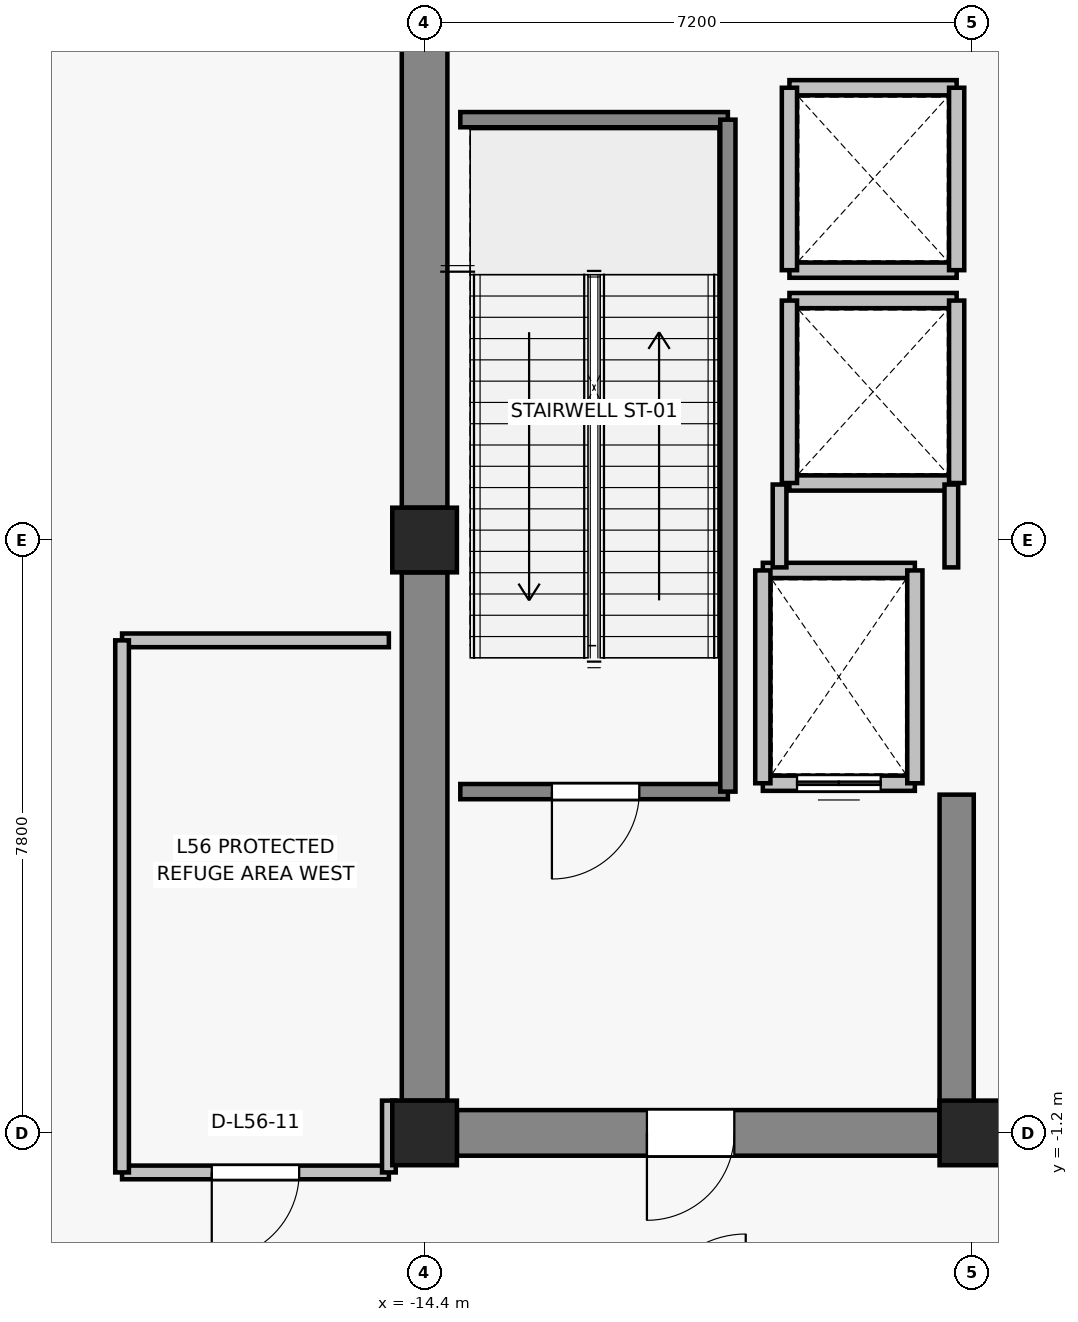
"""IFC4 building model, lengths in metres.
Left out: names, types, materials, properties, quantities, classifications, styles, units other than length and angle.
Written with IfcOpenShell. Run it as: python <this file> out.ifc"""

import sys

from ifc_helpers import new_model, si_unit, direction, frame, frame_2d, origin, origin_2d, place, context, subcontext, project, spatial, rectangle, extrude, source, transform, mapped, element, fill, save


model = new_model("IFC4")
c1 = context("Model", 3, precision=1e-05, world=origin(), true_north=direction((0.0, 1.0)))
c2 = subcontext(c1, "Body", "Model", "MODEL_VIEW")
j1 = project(units=[si_unit("LENGTHUNIT", "METRE"), si_unit("PLANEANGLEUNIT", "RADIAN")], contexts=[c1])
p1 = place(None, origin())
s1 = spatial("IfcSite", under=j1, at=p1, CompositionType="ELEMENT")
p2 = place(p1, origin())
s2 = spatial("IfcBuilding", under=s1, at=p2, CompositionType="ELEMENT")
p3 = place(p2, frame((0.0, 0.0, 199.0)))
s3 = spatial("IfcBuildingStorey", under=s2, at=p3, CompositionType="ELEMENT", Elevation=199.0)
for number, where, z_axis, x_axis in (
    (1, (-14.4, -1.2, 0.0), (0.0, 0.0, 1.0), (1.0, 0.0, 0.0)),
    (2, (-7.2, -1.2, 0.0), (0.0, 0.0, 1.0), (1.0, 0.0, 0.0)),
    (3, (-14.4, 6.6, 0.0), (0.0, 0.0, 1.0), (1.0, 0.0, 0.0)),
):
    element("IfcColumn", number, at=place(p3, frame(where, z_axis=z_axis, x_axis=x_axis)), inside=s3, PredefinedType="COLUMN", context=c2, shape_type="SweptSolid", body=[
        extrude(rectangle(XDim=0.85, YDim=0.85, at=origin_2d()), origin(), (0.0, 0.0, 1.0), 6.6),
    ])
p4 = place(p3, frame((-14.4, -0.775, 0.0), z_axis=(0.0, 0.0, 1.0), x_axis=(0.0, 1.0, 0.0)))
e4 = element("IfcWall", 4, at=p4, inside=s3, PredefinedType="SHEAR", context=c2, shape_type="SweptSolid", body=[
    extrude(rectangle(XDim=6.95, YDim=0.6, at=frame_2d((3.475, 0.0))), origin(), (0.0, 0.0, 1.0), 6.35),
])
p5 = place(p3, frame((-14.4, 7.025, 0.0), z_axis=(0.0, 0.0, 1.0), x_axis=(0.0, 1.0, 0.0)))
e5 = element("IfcWall", 5, at=p5, inside=s3, PredefinedType="SHEAR", context=c2, shape_type="SweptSolid", body=[
    extrude(rectangle(XDim=6.05, YDim=0.6, at=frame_2d((3.025, 0.0))), origin(), (0.0, 0.0, 1.0), 6.35),
])
p6 = place(p3, frame((-7.625, -1.2, 0.0), z_axis=(0.0, 0.0, 1.0), x_axis=(-1.0, 0.0, 0.0)))
e6 = element("IfcWall", 6, at=p6, inside=s3, PredefinedType="SHEAR", context=c2, shape_type="SweptSolid", body=[
    extrude(rectangle(XDim=6.35, YDim=0.6, at=frame_2d((3.175, 0.0))), origin(), (0.0, 0.0, 1.0), 6.35),
])
p7 = place(p6, frame((2.7, 0.0, 0.0)))
e7 = element("IfcOpeningElement", 7, at=p7, cuts=e6, PredefinedType="OPENING", context=c2, shape_type="SweptSolid", body=[
    extrude(rectangle(XDim=1.15, YDim=2.15, at=frame_2d((0.575, 1.075))), frame((0.0, 0.31, 0.0), z_axis=(0.0, -1.0, 0.0), x_axis=(1.0, 0.0, 0.0)), (0.0, 0.0, 1.0), 0.62),
])
p8 = place(p3, frame((-7.4, -0.9, 0.0), z_axis=(0.0, 0.0, 1.0), x_axis=(0.0, 1.0, 0.0)))
e8 = element("IfcWall", 8, at=p8, inside=s3, PredefinedType="SHEAR", context=c2, shape_type="SweptSolid", body=[
    extrude(rectangle(XDim=4.15, YDim=0.45, at=frame_2d((2.075, 0.0))), origin(), (0.0, 0.0, 1.0), 6.35),
])
p9 = place(p3, frame((-7.95, 3.4, 0.0), z_axis=(0.0, 0.0, 1.0), x_axis=(-1.0, 0.0, 0.0)))
e9 = element("IfcWall", 9, at=p9, inside=s3, PredefinedType="SOLIDWALL", context=c2, shape_type="SweptSolid", body=[
    extrude(rectangle(XDim=2.0, YDim=0.2, at=frame_2d((1.0, 0.0))), origin(), (0.0, 0.0, 1.0), 6.35),
])
p10 = place(p9, frame((0.45, 0.0, 0.0)))
e10 = element("IfcOpeningElement", 10, at=p10, cuts=e9, PredefinedType="OPENING", context=c2, shape_type="SweptSolid", body=[
    extrude(rectangle(XDim=1.1, YDim=2.2, at=frame_2d((0.55, 1.1))), frame((0.0, 0.11, 0.0), z_axis=(0.0, -1.0, 0.0), x_axis=(1.0, 0.0, 0.0)), (0.0, 0.0, 1.0), 0.22),
])
p11 = place(p3, frame((-9.95, 6.2, 0.0), z_axis=(0.0, 0.0, 1.0), x_axis=(1.0, 0.0, 0.0)))
e11 = element("IfcWall", 11, at=p11, inside=s3, PredefinedType="SOLIDWALL", context=c2, shape_type="SweptSolid", body=[
    extrude(rectangle(XDim=2.0, YDim=0.2, at=frame_2d((1.0, 0.0))), origin(), (0.0, 0.0, 1.0), 6.35),
])
for number, where, z_axis, x_axis in (
    (12, (-9.95, 3.4, 0.0), (0.0, 0.0, 1.0), (0.0, 1.0, 0.0)),
    (13, (-7.95, 6.2, 0.0), (0.0, 0.0, 1.0), (0.0, -1.0, 0.0)),
):
    element("IfcWall", number, at=place(p3, frame(where, z_axis=z_axis, x_axis=x_axis)), inside=s3, PredefinedType="SOLIDWALL", context=c2, shape_type="SweptSolid", body=[
        extrude(rectangle(XDim=2.8, YDim=0.2, at=frame_2d((1.4, 0.0))), origin(), (0.0, 0.0, 1.0), 6.35),
    ])
for number, where, z_axis, x_axis in (
    (14, (-7.4, 7.35, 0.0), (0.0, 0.0, 1.0), (-1.0, 0.0, 0.0)),
    (15, (-9.6, 9.75, 0.0), (0.0, 0.0, 1.0), (1.0, 0.0, 0.0)),
):
    element("IfcWall", number, at=place(p3, frame(where, z_axis=z_axis, x_axis=x_axis)), inside=s3, PredefinedType="SOLIDWALL", context=c2, shape_type="SweptSolid", body=[
        extrude(rectangle(XDim=2.2, YDim=0.2, at=frame_2d((1.1, 0.0))), origin(), (0.0, 0.0, 1.0), 5.89),
    ])
p12 = place(p3, frame((-9.6, 7.35, 0.0), z_axis=(0.0, 0.0, 1.0), x_axis=(0.0, 1.0, 0.0)))
e16 = element("IfcWall", 16, at=p12, inside=s3, PredefinedType="SOLIDWALL", context=c2, shape_type="SweptSolid", body=[
    extrude(rectangle(XDim=2.4, YDim=0.2, at=frame_2d((1.2, 0.0))), origin(), (0.0, 0.0, 1.0), 6.35),
])
p13 = place(p3, frame((-7.4, 9.75, 0.0), z_axis=(0.0, 0.0, 1.0), x_axis=(0.0, -1.0, 0.0)))
e17 = element("IfcWall", 17, at=p13, inside=s3, PredefinedType="SOLIDWALL", context=c2, shape_type="SweptSolid", body=[
    extrude(rectangle(XDim=2.4, YDim=0.2, at=frame_2d((1.2, 0.0))), origin(), (0.0, 0.0, 1.0), 5.89),
])
for number, where, z_axis, x_axis in (
    (18, (-7.4, 10.15, 0.0), (0.0, 0.0, 1.0), (-1.0, 0.0, 0.0)),
    (19, (-9.6, 12.55, 0.0), (0.0, 0.0, 1.0), (1.0, 0.0, 0.0)),
):
    element("IfcWall", number, at=place(p3, frame(where, z_axis=z_axis, x_axis=x_axis)), inside=s3, PredefinedType="SOLIDWALL", context=c2, shape_type="SweptSolid", body=[
        extrude(rectangle(XDim=2.2, YDim=0.2, at=frame_2d((1.1, 0.0))), origin(), (0.0, 0.0, 1.0), 5.89),
    ])
p14 = place(p3, frame((-9.6, 10.15, 0.0), z_axis=(0.0, 0.0, 1.0), x_axis=(0.0, 1.0, 0.0)))
e20 = element("IfcWall", 20, at=p14, inside=s3, PredefinedType="SOLIDWALL", context=c2, shape_type="SweptSolid", body=[
    extrude(rectangle(XDim=2.4, YDim=0.2, at=frame_2d((1.2, 0.0))), origin(), (0.0, 0.0, 1.0), 6.35),
])
p15 = place(p3, frame((-7.4, 12.55, 0.0), z_axis=(0.0, 0.0, 1.0), x_axis=(0.0, -1.0, 0.0)))
e21 = element("IfcWall", 21, at=p15, inside=s3, PredefinedType="SOLIDWALL", context=c2, shape_type="SweptSolid", body=[
    extrude(rectangle(XDim=2.4, YDim=0.2, at=frame_2d((1.2, 0.0))), origin(), (0.0, 0.0, 1.0), 5.89),
])
p16 = place(p3, frame((-10.41, 3.29, 0.0), z_axis=(0.0, 0.0, 1.0), x_axis=(-1.0, 0.0, 0.0)))
e22 = element("IfcWall", 22, at=p16, inside=s3, PredefinedType="SOLIDWALL", context=c2, shape_type="SweptSolid", body=[
    extrude(rectangle(XDim=3.52, YDim=0.2, at=frame_2d((1.76, 0.0))), origin(), (0.0, 0.0, 1.0), 6.35),
])
p17 = place(p16, frame((1.165, 0.0, 0.0)))
e23 = element("IfcOpeningElement", 23, at=p17, cuts=e22, PredefinedType="OPENING", context=c2, shape_type="SweptSolid", body=[
    extrude(rectangle(XDim=1.15, YDim=2.15, at=frame_2d((0.575, 1.075))), frame((0.0, 0.11, 0.0), z_axis=(0.0, -1.0, 0.0), x_axis=(1.0, 0.0, 0.0)), (0.0, 0.0, 1.0), 0.22),
])
p18 = place(p3, frame((-13.93, 12.13, 0.0), z_axis=(0.0, 0.0, 1.0), x_axis=(1.0, 0.0, 0.0)))
e24 = element("IfcWall", 24, at=p18, inside=s3, PredefinedType="SOLIDWALL", context=c2, shape_type="SweptSolid", body=[
    extrude(rectangle(XDim=3.52, YDim=0.2, at=frame_2d((1.76, 0.0))), origin(), (0.0, 0.0, 1.0), 6.35),
])
p19 = place(p3, frame((-10.41, 12.13, 0.0), z_axis=(0.0, 0.0, 1.0), x_axis=(0.0, -1.0, 0.0)))
e25 = element("IfcWall", 25, at=p19, inside=s3, PredefinedType="SOLIDWALL", context=c2, shape_type="SweptSolid", body=[
    extrude(rectangle(XDim=8.84, YDim=0.2, at=frame_2d((4.42, 0.0))), origin(), (0.0, 0.0, 1.0), 6.35),
])
p20 = place(p3, frame((-9.73, 6.24, 0.0), z_axis=(0.0, 0.0, 1.0), x_axis=(0.0, 1.0, 0.0)))
e26 = element("IfcWall", 26, at=p20, inside=s3, PredefinedType="PARTITIONING", context=c2, shape_type="SweptSolid", body=[
    extrude(rectangle(XDim=1.09, YDim=0.18, at=frame_2d((0.545, 0.0))), origin(), (0.0, 0.0, 1.0), 6.35),
])
p21 = place(p3, frame((-7.47, 7.33, 0.0), z_axis=(0.0, 0.0, 1.0), x_axis=(0.0, -1.0, 0.0)))
e27 = element("IfcWall", 27, at=p21, inside=s3, PredefinedType="PARTITIONING", context=c2, shape_type="SweptSolid", body=[
    extrude(rectangle(XDim=1.09, YDim=0.18, at=frame_2d((0.545, 0.0))), origin(), (0.0, 0.0, 1.0), 5.89),
])
p22 = place(p3, frame((-14.87, -1.72, 0.0), z_axis=(0.0, 0.0, 1.0), x_axis=(-1.0, 0.0, 0.0)))
e28 = element("IfcWall", 28, at=p22, inside=s3, PredefinedType="PARTITIONING", context=c2, shape_type="SweptSolid", body=[
    extrude(rectangle(XDim=3.51, YDim=0.18, at=frame_2d((1.755, 0.0))), origin(), (0.0, 0.0, 1.0), 6.35),
])
p23 = place(p22, frame((1.18, 0.0, 0.0)))
e29 = element("IfcOpeningElement", 29, at=p23, cuts=e28, PredefinedType="OPENING", context=c2, shape_type="SweptSolid", body=[
    extrude(rectangle(XDim=1.15, YDim=2.15, at=frame_2d((0.575, 1.075))), frame((0.0, 0.1, 0.0), z_axis=(0.0, -1.0, 0.0), x_axis=(1.0, 0.0, 0.0)), (0.0, 0.0, 1.0), 0.2),
])
p24 = place(p3, frame((-18.38, 5.28, 0.0), z_axis=(0.0, 0.0, 1.0), x_axis=(1.0, 0.0, 0.0)))
e30 = element("IfcWall", 30, at=p24, inside=s3, PredefinedType="PARTITIONING", context=c2, shape_type="SweptSolid", body=[
    extrude(rectangle(XDim=3.51, YDim=0.18, at=frame_2d((1.755, 0.0))), origin(), (0.0, 0.0, 1.0), 6.35),
])
p25 = place(p3, frame((-18.38, -1.72, 0.0), z_axis=(0.0, 0.0, 1.0), x_axis=(0.0, 1.0, 0.0)))
e31 = element("IfcWall", 31, at=p25, inside=s3, PredefinedType="PARTITIONING", context=c2, shape_type="SweptSolid", body=[
    extrude(rectangle(XDim=7.0, YDim=0.18, at=frame_2d((3.5, 0.0))), origin(), (0.0, 0.0, 1.0), 5.332),
])
p26 = place(p3, frame((-14.87, -0.775, 0.0), z_axis=(0.0, 0.0, 1.0), x_axis=(0.0, -1.0, 0.0)))
e32 = element("IfcWall", 32, at=p26, inside=s3, PredefinedType="PARTITIONING", context=c2, shape_type="SweptSolid", body=[
    extrude(rectangle(XDim=0.945, YDim=0.18, at=frame_2d((0.473, 0.0))), origin(), (0.0, 0.0, 1.0), 5.332),
])
m1 = source(origin(), c2, "Body", "SweptSolid", [
    extrude(rectangle(XDim=1.1, YDim=2.2, at=frame_2d((0.55, 1.1))), frame((0.0, 0.025, 0.0), z_axis=(0.0, -1.0, 0.0), x_axis=(1.0, 0.0, 0.0)), (0.0, 0.0, 1.0), 0.05),
])
p27 = place(p10, origin())
e33 = element("IfcDoor", 33, at=p27, inside=s3, OperationType="DOUBLE_DOOR_SLIDING", PredefinedType="DOOR", context=c2, shape_type="MappedRepresentation", body=[
    mapped(m1, transform((0.0, 0.0, 0.0), x_axis=(1.0, 0.0, 0.0), y_axis=(0.0, 1.0, 0.0), z_axis=(0.0, 0.0, 1.0), scale=1.0)),
])
fill(e10, e33)
m2 = source(origin(), c2, "Body", "SweptSolid", [
    extrude(rectangle(XDim=1.15, YDim=2.15, at=frame_2d((0.575, 1.075))), frame((0.0, 0.025, 0.0), z_axis=(0.0, -1.0, 0.0), x_axis=(1.0, 0.0, 0.0)), (0.0, 0.0, 1.0), 0.05),
])
p28 = place(p17, origin())
e34 = element("IfcDoor", 34, at=p28, inside=s3, OperationType="SINGLE_SWING_RIGHT", PredefinedType="DOOR", context=c2, shape_type="MappedRepresentation", body=[
    mapped(m2, transform((0.0, 0.0, 0.0), x_axis=(1.0, 0.0, 0.0), y_axis=(0.0, 1.0, 0.0), z_axis=(0.0, 0.0, 1.0), scale=1.0)),
])
fill(e23, e34)
p29 = place(p7, origin())
e35 = element("IfcDoor", 35, at=p29, inside=s3, OperationType="SINGLE_SWING_RIGHT", PredefinedType="DOOR", context=c2, shape_type="MappedRepresentation", body=[
    mapped(m2, transform((0.0, 0.0, 0.0), x_axis=(1.0, 0.0, 0.0), y_axis=(0.0, 1.0, 0.0), z_axis=(0.0, 0.0, 1.0), scale=1.0)),
])
fill(e7, e35)
p30 = place(p23, origin())
e36 = element("IfcDoor", 36, at=p30, inside=s3, OperationType="SINGLE_SWING_RIGHT", PredefinedType="DOOR", context=c2, shape_type="MappedRepresentation", body=[
    mapped(m2, transform((0.0, 0.0, 0.0), x_axis=(1.0, 0.0, 0.0), y_axis=(0.0, 1.0, 0.0), z_axis=(0.0, 0.0, 1.0), scale=1.0)),
])
fill(e29, e36)
save(model, sys.argv[1])
